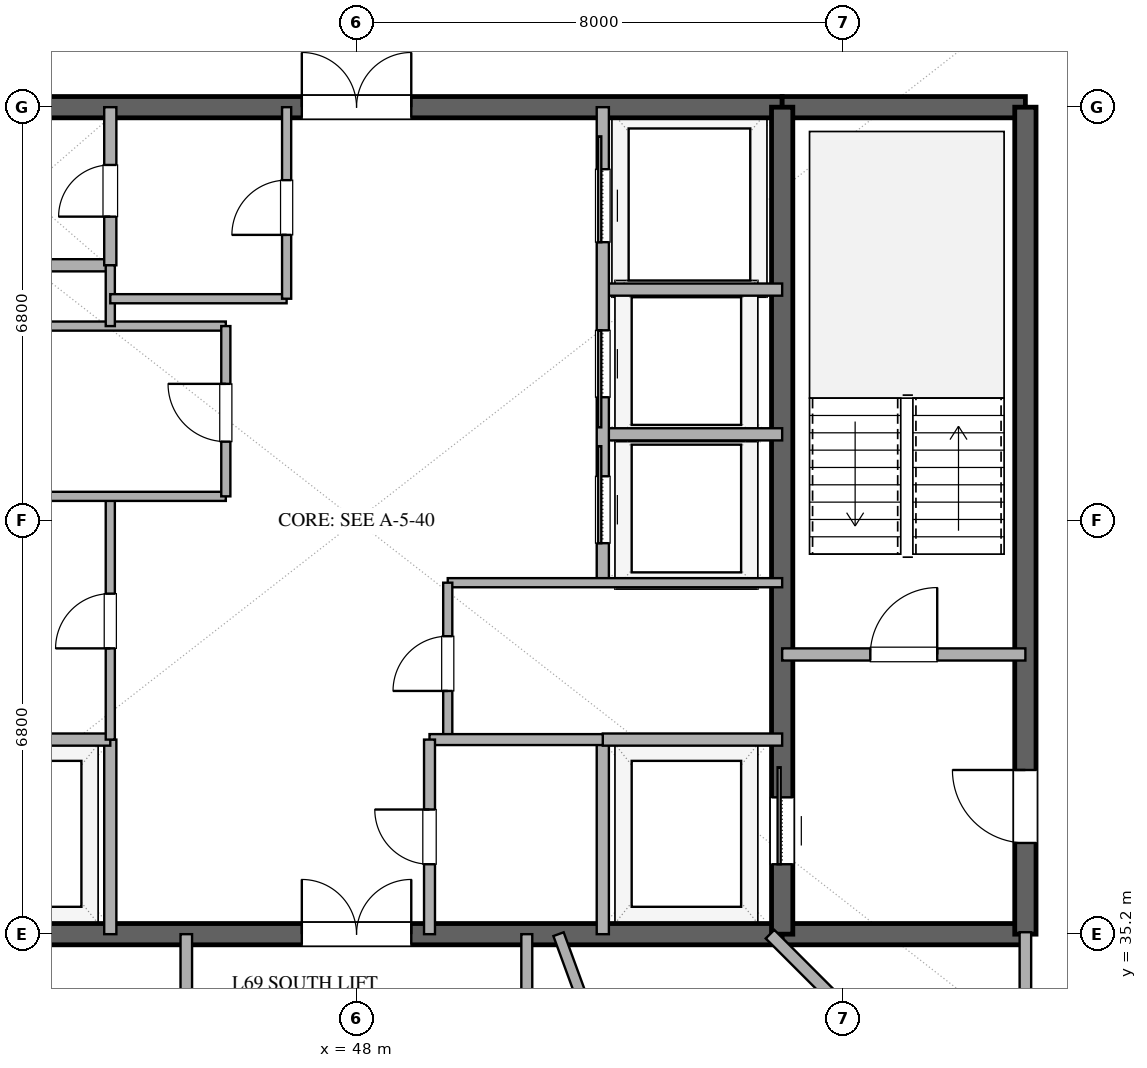
"""IFC4 building model, lengths in metres.
Left out: names, types, materials, properties, quantities, classifications, styles, units other than length and angle.
Written with IfcOpenShell. Run it as: python <this file> out.ifc"""

import sys

from ifc_helpers import new_model, si_unit, direction, frame, frame_2d, origin, place, context, subcontext, project, spatial, rectangle, extrude, element, fill, save


model = new_model("IFC4")
c1 = context("Model", 3, precision=1e-05, world=origin(), true_north=direction((0.0, 1.0)))
c2 = subcontext(c1, "Body", "Model", "MODEL_VIEW")
j1 = project(units=[si_unit("LENGTHUNIT", "METRE"), si_unit("PLANEANGLEUNIT", "RADIAN")], contexts=[c1])
p1 = place(None, origin())
s1 = spatial("IfcSite", under=j1, at=p1, CompositionType="ELEMENT")
p2 = place(p1, origin())
s2 = spatial("IfcBuilding", under=s1, at=p2, CompositionType="ELEMENT")
p3 = place(p2, frame((0.0, 0.0, 269.4)))
s3 = spatial("IfcBuildingStorey", under=s2, at=p3, CompositionType="ELEMENT", Elevation=269.4)
p4 = place(p3, frame((41.0, 35.2, 0.0), z_axis=(0.0, 0.0, 1.0), x_axis=(1.0, 0.0, 0.0)))
e1 = element("IfcWall", 1, at=p4, inside=s3, PredefinedType="SHEAR", context=c2, shape_type="SweptSolid", body=[
    extrude(rectangle(XDim=14.0, YDim=0.35, at=frame_2d((7.0, 0.0))), origin(), (0.0, 0.0, 1.0), 3.37),
])
p5 = place(p4, frame((6.1, 0.0, 0.0)))
e2 = element("IfcOpeningElement", 2, at=p5, cuts=e1, PredefinedType="OPENING", context=c2, shape_type="SweptSolid", body=[
    extrude(rectangle(XDim=1.8, YDim=2.25, at=frame_2d((0.9, 1.125))), frame((0.0, 0.185, 0.0), z_axis=(0.0, -1.0, 0.0), x_axis=(1.0, 0.0, 0.0)), (0.0, 0.0, 1.0), 0.37),
])
p6 = place(p3, frame((55.0, 35.2, 0.0), z_axis=(0.0, 0.0, 1.0), x_axis=(1.0, 0.0, 0.0)))
e3 = element("IfcWall", 3, at=p6, inside=s3, PredefinedType="SHEAR", context=c2, shape_type="SweptSolid", body=[
    extrude(rectangle(XDim=4.0, YDim=0.35, at=frame_2d((2.0, 0.0))), origin(), (0.0, 0.0, 1.0), 3.37),
])
p7 = place(p3, frame((41.0, 48.8, 0.0), z_axis=(0.0, 0.0, 1.0), x_axis=(1.0, 0.0, 0.0)))
e4 = element("IfcWall", 4, at=p7, inside=s3, PredefinedType="SHEAR", context=c2, shape_type="SweptSolid", body=[
    extrude(rectangle(XDim=14.0, YDim=0.35, at=frame_2d((7.0, 0.0))), origin(), (0.0, 0.0, 1.0), 3.37),
])
p8 = place(p7, frame((6.1, 0.0, 0.0)))
e5 = element("IfcOpeningElement", 5, at=p8, cuts=e4, PredefinedType="OPENING", context=c2, shape_type="SweptSolid", body=[
    extrude(rectangle(XDim=1.8, YDim=2.25, at=frame_2d((0.9, 1.125))), frame((0.0, 0.185, 0.0), z_axis=(0.0, -1.0, 0.0), x_axis=(1.0, 0.0, 0.0)), (0.0, 0.0, 1.0), 0.37),
])
p9 = place(p3, frame((55.0, 48.8, 0.0), z_axis=(0.0, 0.0, 1.0), x_axis=(1.0, 0.0, 0.0)))
e6 = element("IfcWall", 6, at=p9, inside=s3, PredefinedType="SHEAR", context=c2, shape_type="SweptSolid", body=[
    extrude(rectangle(XDim=4.0, YDim=0.35, at=frame_2d((2.0, 0.0))), origin(), (0.0, 0.0, 1.0), 3.37),
])
p10 = place(p3, frame((59.0, 35.2, 0.0), z_axis=(0.0, 0.0, 1.0), x_axis=(0.0, 1.0, 0.0)))
e7 = element("IfcWall", 7, at=p10, inside=s3, PredefinedType="SHEAR", context=c2, shape_type="SweptSolid", body=[
    extrude(rectangle(XDim=13.6, YDim=0.35, at=frame_2d((6.8, 0.0))), origin(), (0.0, 0.0, 1.0), 3.37),
])
p11 = place(p10, frame((1.5, 0.0, 0.0)))
e8 = element("IfcOpeningElement", 8, at=p11, cuts=e7, PredefinedType="OPENING", context=c2, shape_type="SweptSolid", body=[
    extrude(rectangle(XDim=1.2, YDim=2.15, at=frame_2d((0.6, 1.075))), frame((0.0, 0.185, 0.0), z_axis=(0.0, -1.0, 0.0), x_axis=(1.0, 0.0, 0.0)), (0.0, 0.0, 1.0), 0.37),
])
p12 = place(p3, frame((55.0, 35.2, 0.0), z_axis=(0.0, 0.0, 1.0), x_axis=(0.0, 1.0, 0.0)))
e9 = element("IfcWall", 9, at=p12, inside=s3, PredefinedType="SHEAR", context=c2, shape_type="SweptSolid", body=[
    extrude(rectangle(XDim=13.6, YDim=0.35, at=frame_2d((6.8, 0.0))), origin(), (0.0, 0.0, 1.0), 3.37),
])
p13 = place(p12, frame((1.15, 0.0, 0.0)))
e10 = element("IfcOpeningElement", 10, at=p13, cuts=e9, PredefinedType="OPENING", context=c2, shape_type="SweptSolid", body=[
    extrude(rectangle(XDim=1.1, YDim=2.2, at=frame_2d((0.55, 1.1))), frame((0.0, 0.185, 0.0), z_axis=(0.0, -1.0, 0.0), x_axis=(1.0, 0.0, 0.0)), (0.0, 0.0, 1.0), 0.37),
])
p14 = place(p3, frame((55.0, 39.8, 0.0), z_axis=(0.0, 0.0, 1.0), x_axis=(1.0, 0.0, 0.0)))
e11 = element("IfcWall", 11, at=p14, inside=s3, PredefinedType="SOLIDWALL", context=c2, shape_type="SweptSolid", body=[
    extrude(rectangle(XDim=4.0, YDim=0.2, at=frame_2d((2.0, 0.0))), origin(), (0.0, 0.0, 1.0), 2.73),
])
p15 = place(p14, frame((1.45, 0.0, 0.0)))
e12 = element("IfcOpeningElement", 12, at=p15, cuts=e11, PredefinedType="OPENING", context=c2, shape_type="SweptSolid", body=[
    extrude(rectangle(XDim=1.1, YDim=2.15, at=frame_2d((0.55, 1.075))), frame((0.0, 0.11, 0.0), z_axis=(0.0, -1.0, 0.0), x_axis=(1.0, 0.0, 0.0)), (0.0, 0.0, 1.0), 0.22),
])
p16 = place(p3, frame((43.95, 35.2, 0.0), z_axis=(0.0, 0.0, 1.0), x_axis=(0.0, 1.0, 0.0)))
e13 = element("IfcWall", 13, at=p16, inside=s3, PredefinedType="SOLIDWALL", context=c2, shape_type="SweptSolid", body=[
    extrude(rectangle(XDim=3.2, YDim=0.2, at=frame_2d((1.6, 0.0))), origin(), (0.0, 0.0, 1.0), 2.73),
])
p17 = place(p3, frame((41.0, 38.4, 0.0), z_axis=(0.0, 0.0, 1.0), x_axis=(1.0, 0.0, 0.0)))
e14 = element("IfcWall", 14, at=p17, inside=s3, PredefinedType="SOLIDWALL", context=c2, shape_type="SweptSolid", body=[
    extrude(rectangle(XDim=2.95, YDim=0.2, at=frame_2d((1.475, 0.0))), origin(), (0.0, 0.0, 1.0), 2.73),
])
p18 = place(p3, frame((52.05, 35.2, 0.0), z_axis=(0.0, 0.0, 1.0), x_axis=(0.0, 1.0, 0.0)))
e15 = element("IfcWall", 15, at=p18, inside=s3, PredefinedType="SOLIDWALL", context=c2, shape_type="SweptSolid", body=[
    extrude(rectangle(XDim=3.2, YDim=0.2, at=frame_2d((1.6, 0.0))), origin(), (0.0, 0.0, 1.0), 2.73),
])
for number, where, z_axis, x_axis in (
    (16, (52.05, 38.4, 0.0), (0.0, 0.0, 1.0), (1.0, 0.0, 0.0)),
    (17, (41.0, 46.2, 0.0), (0.0, 0.0, 1.0), (1.0, 0.0, 0.0)),
):
    element("IfcWall", number, at=place(p3, frame(where, z_axis=z_axis, x_axis=x_axis)), inside=s3, PredefinedType="SOLIDWALL", context=c2, shape_type="SweptSolid", body=[
        extrude(rectangle(XDim=2.95, YDim=0.2, at=frame_2d((1.475, 0.0))), origin(), (0.0, 0.0, 1.0), 2.73),
    ])
p19 = place(p3, frame((43.95, 46.2, 0.0), z_axis=(0.0, 0.0, 1.0), x_axis=(0.0, 1.0, 0.0)))
e18 = element("IfcWall", 18, at=p19, inside=s3, PredefinedType="SOLIDWALL", context=c2, shape_type="SweptSolid", body=[
    extrude(rectangle(XDim=2.6, YDim=0.2, at=frame_2d((1.3, 0.0))), origin(), (0.0, 0.0, 1.0), 2.73),
])
p20 = place(p19, frame((0.8, 0.0, 0.0)))
e19 = element("IfcOpeningElement", 19, at=p20, cuts=e18, PredefinedType="OPENING", context=c2, shape_type="SweptSolid", body=[
    extrude(rectangle(XDim=0.85, YDim=2.15, at=frame_2d((0.425, 1.075))), frame((0.0, 0.11, 0.0), z_axis=(0.0, -1.0, 0.0), x_axis=(1.0, 0.0, 0.0)), (0.0, 0.0, 1.0), 0.22),
])
p21 = place(p3, frame((43.95, 38.4, 0.0), z_axis=(0.0, 0.0, 1.0), x_axis=(0.0, 1.0, 0.0)))
e20 = element("IfcWall", 20, at=p21, inside=s3, PredefinedType="PARTITIONING", context=c2, shape_type="SweptSolid", body=[
    extrude(rectangle(XDim=4.0, YDim=0.15, at=frame_2d((2.0, 0.0))), origin(), (0.0, 0.0, 1.0), 2.73),
])
p22 = place(p21, frame((1.5, 0.0, 0.0)))
e21 = element("IfcOpeningElement", 21, at=p22, cuts=e20, PredefinedType="OPENING", context=c2, shape_type="SweptSolid", body=[
    extrude(rectangle(XDim=0.9, YDim=2.15, at=frame_2d((0.45, 1.075))), frame((0.0, 0.085, 0.0), z_axis=(0.0, -1.0, 0.0), x_axis=(1.0, 0.0, 0.0)), (0.0, 0.0, 1.0), 0.17),
])
for number, where, z_axis, x_axis in (
    (22, (41.0, 42.4, 0.0), (0.0, 0.0, 1.0), (1.0, 0.0, 0.0)),
    (23, (41.0, 45.2, 0.0), (0.0, 0.0, 1.0), (1.0, 0.0, 0.0)),
):
    element("IfcWall", number, at=place(p3, frame(where, z_axis=z_axis, x_axis=x_axis)), inside=s3, PredefinedType="PARTITIONING", context=c2, shape_type="SweptSolid", body=[
        extrude(rectangle(XDim=4.85, YDim=0.15, at=frame_2d((2.425, 0.0))), origin(), (0.0, 0.0, 1.0), 2.73),
    ])
p23 = place(p3, frame((43.95, 45.2, 0.0), z_axis=(0.0, 0.0, 1.0), x_axis=(0.0, 1.0, 0.0)))
e24 = element("IfcWall", 24, at=p23, inside=s3, PredefinedType="PARTITIONING", context=c2, shape_type="SweptSolid", body=[
    extrude(rectangle(XDim=1.0, YDim=0.15, at=frame_2d((0.5, 0.0))), origin(), (0.0, 0.0, 1.0), 2.73),
])
p24 = place(p3, frame((45.85, 42.4, 0.0), z_axis=(0.0, 0.0, 1.0), x_axis=(0.0, 1.0, 0.0)))
e25 = element("IfcWall", 25, at=p24, inside=s3, PredefinedType="PARTITIONING", context=c2, shape_type="SweptSolid", body=[
    extrude(rectangle(XDim=2.8, YDim=0.15, at=frame_2d((1.4, 0.0))), origin(), (0.0, 0.0, 1.0), 2.73),
])
p25 = place(p24, frame((0.9, 0.0, 0.0)))
e26 = element("IfcOpeningElement", 26, at=p25, cuts=e25, PredefinedType="OPENING", context=c2, shape_type="SweptSolid", body=[
    extrude(rectangle(XDim=0.95, YDim=2.15, at=frame_2d((0.475, 1.075))), frame((0.0, 0.085, 0.0), z_axis=(0.0, -1.0, 0.0), x_axis=(1.0, 0.0, 0.0)), (0.0, 0.0, 1.0), 0.17),
])
for number, where, z_axis, x_axis in (
    (27, (52.05, 43.42, 0.0), (0.0, 0.0, 1.0), (1.0, 0.0, 0.0)),
    (28, (52.05, 45.8, 0.0), (0.0, 0.0, 1.0), (1.0, 0.0, 0.0)),
):
    element("IfcWall", number, at=place(p3, frame(where, z_axis=z_axis, x_axis=x_axis)), inside=s3, PredefinedType="SOLIDWALL", context=c2, shape_type="SweptSolid", body=[
        extrude(rectangle(XDim=2.95, YDim=0.2, at=frame_2d((1.475, 0.0))), origin(), (0.0, 0.0, 1.0), 2.73),
    ])
p26 = place(p3, frame((52.05, 40.98, 0.0), z_axis=(0.0, 0.0, 1.0), x_axis=(0.0, 1.0, 0.0)))
e29 = element("IfcWall", 29, at=p26, inside=s3, PredefinedType="SOLIDWALL", context=c2, shape_type="SweptSolid", body=[
    extrude(rectangle(XDim=7.82, YDim=0.2, at=frame_2d((3.91, 0.0))), origin(), (0.0, 0.0, 1.0), 2.73),
])
p27 = place(p26, frame((0.65, 0.0, 0.0)))
e30 = element("IfcOpeningElement", 30, at=p27, cuts=e29, PredefinedType="OPENING", context=c2, shape_type="SweptSolid", body=[
    extrude(rectangle(XDim=1.1, YDim=2.2, at=frame_2d((0.55, 1.1))), frame((0.0, 0.11, 0.0), z_axis=(0.0, -1.0, 0.0), x_axis=(1.0, 0.0, 0.0)), (0.0, 0.0, 1.0), 0.22),
])
p28 = place(p26, frame((3.05, 0.0, 0.0)))
e31 = element("IfcOpeningElement", 31, at=p28, cuts=e29, PredefinedType="OPENING", context=c2, shape_type="SweptSolid", body=[
    extrude(rectangle(XDim=1.1, YDim=2.2, at=frame_2d((0.55, 1.1))), frame((0.0, 0.11, 0.0), z_axis=(0.0, -1.0, 0.0), x_axis=(1.0, 0.0, 0.0)), (0.0, 0.0, 1.0), 0.22),
])
p29 = place(p26, frame((5.6, 0.0, 0.0)))
e32 = element("IfcOpeningElement", 32, at=p29, cuts=e29, PredefinedType="OPENING", context=c2, shape_type="SweptSolid", body=[
    extrude(rectangle(XDim=1.2, YDim=2.2, at=frame_2d((0.6, 1.1))), frame((0.0, 0.11, 0.0), z_axis=(0.0, -1.0, 0.0), x_axis=(1.0, 0.0, 0.0)), (0.0, 0.0, 1.0), 0.22),
])
p30 = place(p3, frame((49.5, 40.98, 0.0), z_axis=(0.0, 0.0, 1.0), x_axis=(1.0, 0.0, 0.0)))
e33 = element("IfcWall", 33, at=p30, inside=s3, PredefinedType="PARTITIONING", context=c2, shape_type="SweptSolid", body=[
    extrude(rectangle(XDim=5.5, YDim=0.15, at=frame_2d((2.75, 0.0))), origin(), (0.0, 0.0, 1.0), 2.73),
])
p31 = place(p3, frame((49.5, 38.4, 0.0), z_axis=(0.0, 0.0, 1.0), x_axis=(0.0, 1.0, 0.0)))
e34 = element("IfcWall", 34, at=p31, inside=s3, PredefinedType="PARTITIONING", context=c2, shape_type="SweptSolid", body=[
    extrude(rectangle(XDim=2.58, YDim=0.15, at=frame_2d((1.29, 0.0))), origin(), (0.0, 0.0, 1.0), 2.73),
])
p32 = place(p31, frame((0.8, 0.0, 0.0)))
e35 = element("IfcOpeningElement", 35, at=p32, cuts=e34, PredefinedType="OPENING", context=c2, shape_type="SweptSolid", body=[
    extrude(rectangle(XDim=0.9, YDim=2.15, at=frame_2d((0.45, 1.075))), frame((0.0, 0.085, 0.0), z_axis=(0.0, -1.0, 0.0), x_axis=(1.0, 0.0, 0.0)), (0.0, 0.0, 1.0), 0.17),
])
p33 = place(p3, frame((43.95, 45.65, 0.0), z_axis=(0.0, 0.0, 1.0), x_axis=(1.0, 0.0, 0.0)))
e36 = element("IfcWall", 36, at=p33, inside=s3, PredefinedType="PARTITIONING", context=c2, shape_type="SweptSolid", body=[
    extrude(rectangle(XDim=2.9, YDim=0.15, at=frame_2d((1.45, 0.0))), origin(), (0.0, 0.0, 1.0), 2.73),
])
p34 = place(p3, frame((46.85, 45.65, 0.0), z_axis=(0.0, 0.0, 1.0), x_axis=(0.0, 1.0, 0.0)))
e37 = element("IfcWall", 37, at=p34, inside=s3, PredefinedType="PARTITIONING", context=c2, shape_type="SweptSolid", body=[
    extrude(rectangle(XDim=3.15, YDim=0.15, at=frame_2d((1.575, 0.0))), origin(), (0.0, 0.0, 1.0), 2.73),
])
p35 = place(p34, frame((1.05, 0.0, 0.0)))
e38 = element("IfcOpeningElement", 38, at=p35, cuts=e37, PredefinedType="OPENING", context=c2, shape_type="SweptSolid", body=[
    extrude(rectangle(XDim=0.9, YDim=2.15, at=frame_2d((0.45, 1.075))), frame((0.0, 0.085, 0.0), z_axis=(0.0, -1.0, 0.0), x_axis=(1.0, 0.0, 0.0)), (0.0, 0.0, 1.0), 0.17),
])
p36 = place(p3, frame((49.2, 38.4, 0.0), z_axis=(0.0, 0.0, 1.0), x_axis=(1.0, 0.0, 0.0)))
e39 = element("IfcWall", 39, at=p36, inside=s3, PredefinedType="PLUMBINGWALL", context=c2, shape_type="SweptSolid", body=[
    extrude(rectangle(XDim=2.85, YDim=0.18, at=frame_2d((1.425, 0.0))), origin(), (0.0, 0.0, 1.0), 2.73),
])
p37 = place(p3, frame((49.2, 35.2, 0.0), z_axis=(0.0, 0.0, 1.0), x_axis=(0.0, 1.0, 0.0)))
e40 = element("IfcWall", 40, at=p37, inside=s3, PredefinedType="PLUMBINGWALL", context=c2, shape_type="SweptSolid", body=[
    extrude(rectangle(XDim=3.2, YDim=0.18, at=frame_2d((1.6, 0.0))), origin(), (0.0, 0.0, 1.0), 2.73),
])
p38 = place(p37, frame((1.15, 0.0, 0.0)))
e41 = element("IfcOpeningElement", 41, at=p38, cuts=e40, PredefinedType="OPENING", context=c2, shape_type="SweptSolid", body=[
    extrude(rectangle(XDim=0.9, YDim=2.1, at=frame_2d((0.45, 1.05))), frame((0.0, 0.1, 0.0), z_axis=(0.0, -1.0, 0.0), x_axis=(1.0, 0.0, 0.0)), (0.0, 0.0, 1.0), 0.2),
])
p39 = place(p3, frame((63.561, 26.439, 0.0), z_axis=(0.0, 0.0, 1.0), x_axis=(-0.707106781187, 0.707106781187, 0.0)))
e42 = element("IfcWall", 42, at=p39, inside=s3, PredefinedType="PARTITIONING", context=c2, shape_type="SweptSolid", body=[
    extrude(rectangle(XDim=12.389, YDim=0.2, at=frame_2d((6.195, 0.0))), origin(), (0.0, 0.0, 1.0), 2.73),
])
p40 = place(p3, frame((51.322, 35.2, 0.0), z_axis=(0.0, 0.0, 1.0), x_axis=(0.343730484072, -0.939068343796, 0.0)))
e43 = element("IfcWall", 43, at=p40, inside=s3, PredefinedType="PLUMBINGWALL", context=c2, shape_type="SweptSolid", body=[
    extrude(rectangle(XDim=7.897, YDim=0.18, at=frame_2d((3.949, 0.0))), origin(), (0.0, 0.0, 1.0), 2.73),
])
p41 = place(p40, frame((3.524, 0.0, 0.0)))
e44 = element("IfcOpeningElement", 44, at=p41, cuts=e43, PredefinedType="OPENING", context=c2, shape_type="SweptSolid", body=[
    extrude(rectangle(XDim=0.85, YDim=2.1, at=frame_2d((0.425, 1.05))), frame((0.0, 0.1, 0.0), z_axis=(0.0, -1.0, 0.0), x_axis=(1.0, 0.0, 0.0)), (0.0, 0.0, 1.0), 0.2),
])
p42 = place(p3, frame((45.2, 35.2, 0.0), z_axis=(0.0, 0.0, 1.0), x_axis=(0.0, -1.0, 0.0)))
e45 = element("IfcWall", 45, at=p42, inside=s3, PredefinedType="PARTITIONING", context=c2, shape_type="SweptSolid", body=[
    extrude(rectangle(XDim=2.1, YDim=0.19, at=frame_2d((1.05, 0.0))), origin(), (0.0, 0.0, 1.0), 2.73),
])
p43 = place(p3, frame((50.8, 35.2, 0.0), z_axis=(0.0, 0.0, 1.0), x_axis=(0.0, -1.0, 0.0)))
e46 = element("IfcWall", 46, at=p43, inside=s3, PredefinedType="PLUMBINGWALL", context=c2, shape_type="SweptSolid", body=[
    extrude(rectangle(XDim=2.1, YDim=0.18, at=frame_2d((1.05, 0.0))), origin(), (0.0, 0.0, 1.0), 2.73),
])
p44 = place(p3, frame((59.0, 34.0, 0.0), z_axis=(0.0, 0.0, 1.0), x_axis=(0.0, 1.0, 0.0)))
e47 = element("IfcWall", 47, at=p44, inside=s3, PredefinedType="PARTITIONING", context=c2, shape_type="SweptSolid", body=[
    extrude(rectangle(XDim=1.232, YDim=0.19, at=frame_2d((0.616, 0.0))), origin(), (0.0, 0.0, 1.0), 2.73),
])
p45 = place(p13, origin())
e48 = element("IfcDoor", 48, at=p45, inside=s3, OperationType="SLIDING_TO_RIGHT", PredefinedType="DOOR", context=c2, shape_type="SweptSolid", body=[
    extrude(rectangle(XDim=1.1, YDim=2.2, at=frame_2d((0.55, 1.1))), frame((0.0, 0.025, 0.0), z_axis=(0.0, -1.0, 0.0), x_axis=(1.0, 0.0, 0.0)), (0.0, 0.0, 1.0), 0.05),
])
fill(e10, e48)
p46 = place(p11, origin())
e49 = element("IfcDoor", 49, at=p46, inside=s3, OperationType="SINGLE_SWING_RIGHT", PredefinedType="DOOR", context=c2, shape_type="SweptSolid", body=[
    extrude(rectangle(XDim=1.2, YDim=2.15, at=frame_2d((0.6, 1.075))), frame((0.0, 0.025, 0.0), z_axis=(0.0, -1.0, 0.0), x_axis=(1.0, 0.0, 0.0)), (0.0, 0.0, 1.0), 0.05),
])
fill(e8, e49)
p47 = place(p5, origin())
e50 = element("IfcDoor", 50, at=p47, inside=s3, OperationType="DOUBLE_DOOR_SINGLE_SWING", PredefinedType="DOOR", context=c2, shape_type="SweptSolid", body=[
    extrude(rectangle(XDim=1.8, YDim=2.25, at=frame_2d((0.9, 1.125))), frame((0.0, 0.025, 0.0), z_axis=(0.0, -1.0, 0.0), x_axis=(1.0, 0.0, 0.0)), (0.0, 0.0, 1.0), 0.05),
])
fill(e2, e50)
p48 = place(p8, origin())
e51 = element("IfcDoor", 51, at=p48, inside=s3, OperationType="DOUBLE_DOOR_SINGLE_SWING", PredefinedType="DOOR", context=c2, shape_type="SweptSolid", body=[
    extrude(rectangle(XDim=1.8, YDim=2.25, at=frame_2d((0.9, 1.125))), frame((0.0, 0.025, 0.0), z_axis=(0.0, -1.0, 0.0), x_axis=(1.0, 0.0, 0.0)), (0.0, 0.0, 1.0), 0.05),
])
fill(e5, e51)
p49 = place(p15, origin())
e52 = element("IfcDoor", 52, at=p49, inside=s3, OperationType="SINGLE_SWING_RIGHT", PredefinedType="DOOR", context=c2, shape_type="SweptSolid", body=[
    extrude(rectangle(XDim=1.1, YDim=2.15, at=frame_2d((0.55, 1.075))), frame((0.0, 0.025, 0.0), z_axis=(0.0, -1.0, 0.0), x_axis=(1.0, 0.0, 0.0)), (0.0, 0.0, 1.0), 0.05),
])
fill(e12, e52)
p50 = place(p20, origin())
e53 = element("IfcDoor", 53, at=p50, inside=s3, OperationType="SINGLE_SWING_LEFT", PredefinedType="DOOR", context=c2, shape_type="SweptSolid", body=[
    extrude(rectangle(XDim=0.85, YDim=2.15, at=frame_2d((0.425, 1.075))), frame((0.0, 0.025, 0.0), z_axis=(0.0, -1.0, 0.0), x_axis=(1.0, 0.0, 0.0)), (0.0, 0.0, 1.0), 0.05),
])
fill(e19, e53)
p51 = place(p22, origin())
e54 = element("IfcDoor", 54, at=p51, inside=s3, OperationType="SINGLE_SWING_LEFT", PredefinedType="DOOR", context=c2, shape_type="SweptSolid", body=[
    extrude(rectangle(XDim=0.9, YDim=2.15, at=frame_2d((0.45, 1.075))), frame((0.0, 0.025, 0.0), z_axis=(0.0, -1.0, 0.0), x_axis=(1.0, 0.0, 0.0)), (0.0, 0.0, 1.0), 0.05),
])
fill(e21, e54)
p52 = place(p25, origin())
e55 = element("IfcDoor", 55, at=p52, inside=s3, OperationType="SINGLE_SWING_RIGHT", PredefinedType="DOOR", context=c2, shape_type="SweptSolid", body=[
    extrude(rectangle(XDim=0.95, YDim=2.15, at=frame_2d((0.475, 1.075))), frame((0.0, 0.025, 0.0), z_axis=(0.0, -1.0, 0.0), x_axis=(1.0, 0.0, 0.0)), (0.0, 0.0, 1.0), 0.05),
])
fill(e26, e55)
p53 = place(p27, origin())
e56 = element("IfcDoor", 56, at=p53, inside=s3, OperationType="SLIDING_TO_RIGHT", PredefinedType="DOOR", context=c2, shape_type="SweptSolid", body=[
    extrude(rectangle(XDim=1.1, YDim=2.2, at=frame_2d((0.55, 1.1))), frame((0.0, 0.025, 0.0), z_axis=(0.0, -1.0, 0.0), x_axis=(1.0, 0.0, 0.0)), (0.0, 0.0, 1.0), 0.05),
])
fill(e30, e56)
p54 = place(p28, origin())
e57 = element("IfcDoor", 57, at=p54, inside=s3, OperationType="SLIDING_TO_LEFT", PredefinedType="DOOR", context=c2, shape_type="SweptSolid", body=[
    extrude(rectangle(XDim=1.1, YDim=2.2, at=frame_2d((0.55, 1.1))), frame((0.0, 0.025, 0.0), z_axis=(0.0, -1.0, 0.0), x_axis=(1.0, 0.0, 0.0)), (0.0, 0.0, 1.0), 0.05),
])
fill(e31, e57)
p55 = place(p29, origin())
e58 = element("IfcDoor", 58, at=p55, inside=s3, OperationType="SLIDING_TO_RIGHT", PredefinedType="DOOR", context=c2, shape_type="SweptSolid", body=[
    extrude(rectangle(XDim=1.2, YDim=2.2, at=frame_2d((0.6, 1.1))), frame((0.0, 0.025, 0.0), z_axis=(0.0, -1.0, 0.0), x_axis=(1.0, 0.0, 0.0)), (0.0, 0.0, 1.0), 0.05),
])
fill(e32, e58)
p56 = place(p32, origin())
e59 = element("IfcDoor", 59, at=p56, inside=s3, OperationType="SINGLE_SWING_LEFT", PredefinedType="DOOR", context=c2, shape_type="SweptSolid", body=[
    extrude(rectangle(XDim=0.9, YDim=2.15, at=frame_2d((0.45, 1.075))), frame((0.0, 0.025, 0.0), z_axis=(0.0, -1.0, 0.0), x_axis=(1.0, 0.0, 0.0)), (0.0, 0.0, 1.0), 0.05),
])
fill(e35, e59)
p57 = place(p35, origin())
e60 = element("IfcDoor", 60, at=p57, inside=s3, OperationType="SINGLE_SWING_LEFT", PredefinedType="DOOR", context=c2, shape_type="SweptSolid", body=[
    extrude(rectangle(XDim=0.9, YDim=2.15, at=frame_2d((0.45, 1.075))), frame((0.0, 0.025, 0.0), z_axis=(0.0, -1.0, 0.0), x_axis=(1.0, 0.0, 0.0)), (0.0, 0.0, 1.0), 0.05),
])
fill(e38, e60)
p58 = place(p38, origin())
e61 = element("IfcDoor", 61, at=p58, inside=s3, OperationType="SINGLE_SWING_RIGHT", PredefinedType="DOOR", context=c2, shape_type="SweptSolid", body=[
    extrude(rectangle(XDim=0.9, YDim=2.1, at=frame_2d((0.45, 1.05))), frame((0.0, 0.025, 0.0), z_axis=(0.0, -1.0, 0.0), x_axis=(1.0, 0.0, 0.0)), (0.0, 0.0, 1.0), 0.05),
])
fill(e41, e61)
save(model, sys.argv[1])
